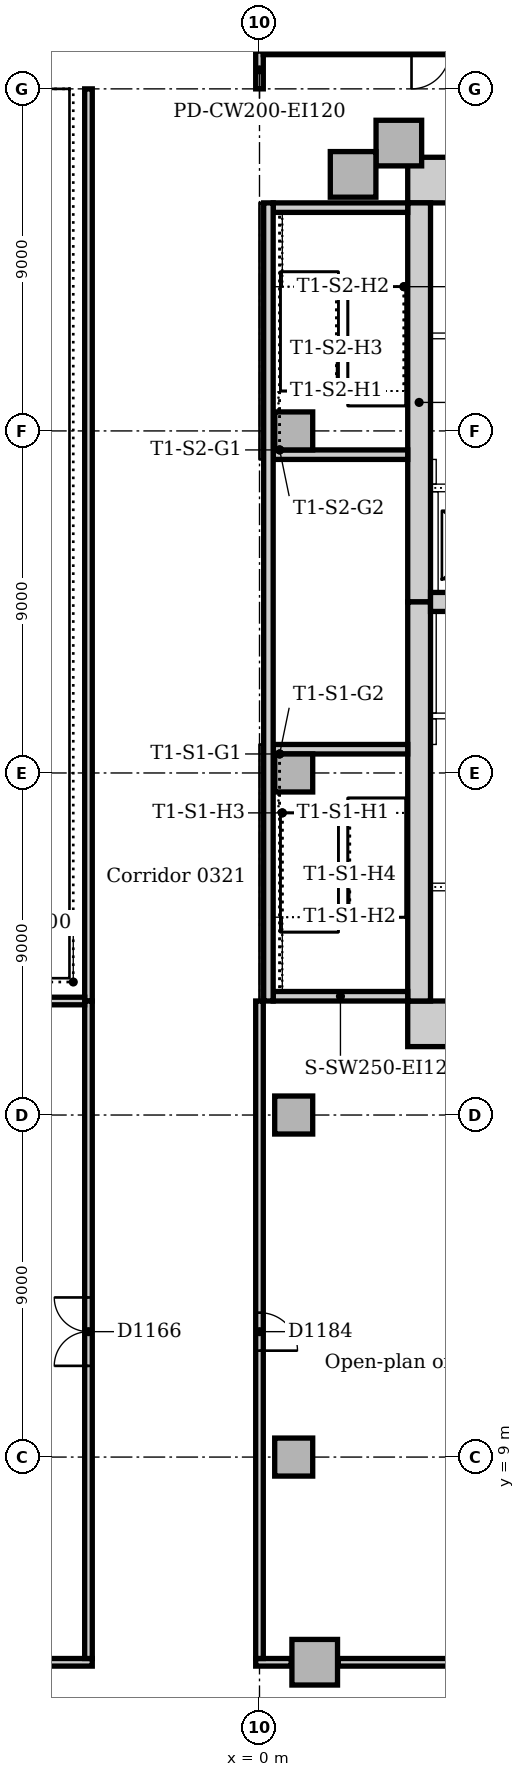
"""IFC4 building model, lengths in metres.
Left out: names, types, materials, properties, quantities, classifications, styles, units other than length and angle.
Written with IfcOpenShell. Run it as: python <this file> out.ifc"""

import sys

from ifc_helpers import new_model, si_unit, direction, frame, frame_2d, origin, origin_2d, place, context, subcontext, project, spatial, rectangle, extrude, element, fill, save


model = new_model("IFC4")
c1 = context("Model", 3, precision=1e-05, world=origin(), true_north=direction((0.0, 1.0)))
c2 = subcontext(c1, "Body", "Model", "MODEL_VIEW")
j1 = project(units=[si_unit("LENGTHUNIT", "METRE"), si_unit("PLANEANGLEUNIT", "RADIAN")], contexts=[c1])
p1 = place(None, origin())
s1 = spatial("IfcSite", under=j1, at=p1, CompositionType="ELEMENT")
p2 = place(p1, origin())
s2 = spatial("IfcBuilding", under=s1, at=p2, CompositionType="ELEMENT")
p3 = place(p2, frame((0.0, 0.0, 16.0)))
s3 = spatial("IfcBuildingStorey", under=s2, at=p3, CompositionType="ELEMENT", Elevation=16.0)
for number, where, z_axis, x_axis in (
    (1, (3.9, 20.4, 0.0), (0.0, 0.0, 1.0), (1.0, 0.0, 0.0)),
    (2, (23.7, 42.6, 0.0), (0.0, 0.0, 1.0), (-1.0, 0.0, 0.0)),
):
    element("IfcWall", number, at=place(p3, frame(where, z_axis=z_axis, x_axis=x_axis)), inside=s3, PredefinedType="SOLIDWALL", context=c2, shape_type="SweptSolid", body=[
        extrude(rectangle(XDim=19.8, YDim=1.2, at=frame_2d((9.9, 0.0))), origin(), (0.0, 0.0, 1.0), 5.0),
    ])
p4 = place(p3, frame((4.2, 42.0, 0.0), z_axis=(0.0, 0.0, 1.0), x_axis=(0.0, -1.0, 0.0)))
e3 = element("IfcWall", 3, at=p4, inside=s3, PredefinedType="SOLIDWALL", context=c2, shape_type="SweptSolid", body=[
    extrude(rectangle(XDim=10.5, YDim=0.6, at=frame_2d((5.25, 0.0))), origin(), (0.0, 0.0, 1.0), 5.0),
])
p5 = place(p4, frame((5.3, 0.0, 0.0)))
e4 = element("IfcOpeningElement", 4, at=p5, cuts=e3, PredefinedType="OPENING", context=c2, shape_type="SweptSolid", body=[
    extrude(rectangle(XDim=1.0, YDim=2.1, at=frame_2d((0.5, 1.05))), frame((0.0, 0.31, 0.0), z_axis=(0.0, -1.0, 0.0), x_axis=(1.0, 0.0, 0.0)), (0.0, 0.0, 1.0), 0.62),
])
p6 = place(p3, frame((4.2, 31.5, 0.0), z_axis=(0.0, 0.0, 1.0), x_axis=(0.0, -1.0, 0.0)))
e5 = element("IfcWall", 5, at=p6, inside=s3, PredefinedType="SOLIDWALL", context=c2, shape_type="SweptSolid", body=[
    extrude(rectangle(XDim=10.5, YDim=0.6, at=frame_2d((5.25, 0.0))), origin(), (0.0, 0.0, 1.0), 5.0),
])
p7 = place(p6, frame((4.25, 0.0, 0.0)))
e6 = element("IfcOpeningElement", 6, at=p7, cuts=e5, PredefinedType="OPENING", context=c2, shape_type="SweptSolid", body=[
    extrude(rectangle(XDim=1.0, YDim=2.1, at=frame_2d((0.5, 1.05))), frame((0.0, 0.31, 0.0), z_axis=(0.0, -1.0, 0.0), x_axis=(1.0, 0.0, 0.0)), (0.0, 0.0, 1.0), 0.62),
])
p8 = place(p3, frame((4.5, 31.5, 0.0), z_axis=(0.0, 0.0, 1.0), x_axis=(1.0, 0.0, 0.0)))
e7 = element("IfcWall", 7, at=p8, inside=s3, PredefinedType="SOLIDWALL", context=c2, shape_type="SweptSolid", body=[
    extrude(rectangle(XDim=18.0, YDim=0.5, at=frame_2d((9.0, 0.0))), origin(), (0.0, 0.0, 1.0), 5.0),
])
p9 = place(p3, frame((0.36, 21.125, 0.0), z_axis=(0.0, 0.0, 1.0), x_axis=(1.0, 0.0, 0.0)))
e8 = element("IfcWall", 8, at=p9, inside=s3, PredefinedType="SOLIDWALL", context=c2, shape_type="SweptSolid", body=[
    extrude(rectangle(XDim=3.54, YDim=0.25, at=frame_2d((1.77, 0.0))), origin(), (0.0, 0.0, 1.0), 5.0),
])
p10 = place(p3, frame((3.9, 27.625, 0.0), z_axis=(0.0, 0.0, 1.0), x_axis=(-1.0, 0.0, 0.0)))
e9 = element("IfcWall", 9, at=p10, inside=s3, PredefinedType="SOLIDWALL", context=c2, shape_type="SweptSolid", body=[
    extrude(rectangle(XDim=3.54, YDim=0.25, at=frame_2d((1.77, 0.0))), origin(), (0.0, 0.0, 1.0), 5.0),
])
p11 = place(p10, frame((0.4, 0.0, 0.0)))
e10 = element("IfcOpeningElement", 10, at=p11, cuts=e9, PredefinedType="OPENING", context=c2, shape_type="SweptSolid", body=[
    extrude(rectangle(XDim=1.0, YDim=2.1, at=frame_2d((0.5, 1.05))), frame((0.0, 0.135, 0.0), z_axis=(0.0, -1.0, 0.0), x_axis=(1.0, 0.0, 0.0)), (0.0, 0.0, 1.0), 0.27),
])
p12 = place(p3, frame((0.36, 35.375, 0.0), z_axis=(0.0, 0.0, 1.0), x_axis=(1.0, 0.0, 0.0)))
e11 = element("IfcWall", 11, at=p12, inside=s3, PredefinedType="SOLIDWALL", context=c2, shape_type="SweptSolid", body=[
    extrude(rectangle(XDim=3.54, YDim=0.25, at=frame_2d((1.77, 0.0))), origin(), (0.0, 0.0, 1.0), 5.0),
])
p13 = place(p12, frame((2.14, 0.0, 0.0)))
e12 = element("IfcOpeningElement", 12, at=p13, cuts=e11, PredefinedType="OPENING", context=c2, shape_type="SweptSolid", body=[
    extrude(rectangle(XDim=1.0, YDim=2.1, at=frame_2d((0.5, 1.05))), frame((0.0, 0.135, 0.0), z_axis=(0.0, -1.0, 0.0), x_axis=(1.0, 0.0, 0.0)), (0.0, 0.0, 1.0), 0.27),
])
p14 = place(p3, frame((3.9, 41.875, 0.0), z_axis=(0.0, 0.0, 1.0), x_axis=(-1.0, 0.0, 0.0)))
e13 = element("IfcWall", 13, at=p14, inside=s3, PredefinedType="SOLIDWALL", context=c2, shape_type="SweptSolid", body=[
    extrude(rectangle(XDim=3.54, YDim=0.25, at=frame_2d((1.77, 0.0))), origin(), (0.0, 0.0, 1.0), 5.0),
])
p15 = place(p3, frame((0.235, 21.0, 0.0), z_axis=(0.0, 0.0, 1.0), x_axis=(0.0, 1.0, 0.0)))
e14 = element("IfcWall", 14, at=p15, inside=s3, PredefinedType="SOLIDWALL", context=c2, shape_type="SweptSolid", body=[
    extrude(rectangle(XDim=21.0, YDim=0.25, at=frame_2d((10.5, 0.0))), origin(), (0.0, 0.0, 1.0), 5.0),
])
for number, where, z_axis, x_axis in (
    (15, (3.667, 43.574, 0.0), (0.0, 0.0, 1.0), (1.0, 0.0, 0.0)),
    (16, (2.463, 42.75, 0.0), (0.0, 0.0, 1.0), (1.0, 0.0, 0.0)),
    (17, (1.453, 3.602, 0.0), (0.0, 0.0, 1.0), (1.0, 0.0, 0.0)),
):
    element("IfcColumn", number, at=place(p3, frame(where, z_axis=z_axis, x_axis=x_axis)), inside=s3, PredefinedType="COLUMN", context=c2, shape_type="SweptSolid", body=[
        extrude(rectangle(XDim=1.2, YDim=1.2, at=origin_2d()), origin(), (0.0, 0.0, 1.0), 4.7),
    ])
for number, where, z_axis, x_axis in (
    (18, (0.9, 9.0, 0.0), (0.0, 0.0, 1.0), (1.0, 0.0, 0.0)),
    (19, (0.9, 18.0, 0.0), (0.0, 0.0, 1.0), (1.0, 0.0, 0.0)),
):
    element("IfcColumn", number, at=place(p3, frame(where, z_axis=z_axis, x_axis=x_axis)), inside=s3, PredefinedType="COLUMN", context=c2, shape_type="SweptSolid", body=[
        extrude(rectangle(XDim=1.0, YDim=1.0, at=origin_2d()), origin(), (0.0, 0.0, 1.0), 4.7),
    ])
for number, where, z_axis, x_axis in (
    (20, (0.9, 27.0, 0.0), (0.0, 0.0, 1.0), (1.0, 0.0, 0.0)),
    (21, (0.9, 36.0, 0.0), (0.0, 0.0, 1.0), (1.0, 0.0, 0.0)),
):
    element("IfcColumn", number, at=place(p3, frame(where, z_axis=z_axis, x_axis=x_axis)), inside=s3, PredefinedType="COLUMN", context=c2, shape_type="SweptSolid", body=[
        extrude(rectangle(XDim=1.0, YDim=1.0, at=origin_2d()), origin(), (0.0, 0.0, 1.0), 5.0),
    ])
p16 = place(p3, frame((-0.1, 3.6, 0.0), z_axis=(0.0, 0.0, 1.0), x_axis=(1.0, 0.0, 0.0)))
e22 = element("IfcWall", 22, at=p16, inside=s3, PredefinedType="PARTITIONING", context=c2, shape_type="SweptSolid", body=[
    extrude(rectangle(XDim=0.933, YDim=0.2, at=frame_2d((0.467, 0.0))), origin(), (0.0, 0.0, 1.0), 4.7),
])
p17 = place(p3, frame((2.073, 3.6, 0.0), z_axis=(0.0, 0.0, 1.0), x_axis=(1.0, 0.0, 0.0)))
e23 = element("IfcWall", 23, at=p17, inside=s3, PredefinedType="PARTITIONING", context=c2, shape_type="SweptSolid", body=[
    extrude(rectangle(XDim=6.927, YDim=0.2, at=frame_2d((3.463, 0.0))), origin(), (0.0, 0.0, 1.0), 4.7),
])
p18 = place(p3, frame((0.0, 45.0, 0.0), z_axis=(0.0, 0.0, 1.0), x_axis=(0.0, 1.0, 0.0)))
e24 = element("IfcWall", 24, at=p18, inside=s3, PredefinedType="PARTITIONING", context=c2, shape_type="SweptSolid", body=[
    extrude(rectangle(XDim=1.0, YDim=0.2, at=frame_2d((0.5, 0.0))), origin(), (0.0, 0.0, 1.0), 4.7),
])
p19 = place(p3, frame((0.1, 46.0, 0.0), z_axis=(0.0, 0.0, 1.0), x_axis=(1.0, 0.0, 0.0)))
e25 = element("IfcWall", 25, at=p19, inside=s3, PredefinedType="PARTITIONING", context=c2, shape_type="SweptSolid", body=[
    extrude(rectangle(XDim=8.9, YDim=0.2, at=frame_2d((4.45, 0.0))), origin(), (0.0, 0.0, 1.0), 4.7),
])
p20 = place(p19, frame((3.9, 0.0, 0.0)))
e26 = element("IfcOpeningElement", 26, at=p20, cuts=e25, PredefinedType="OPENING", context=c2, shape_type="SweptSolid", body=[
    extrude(rectangle(XDim=1.0, YDim=2.1, at=frame_2d((0.5, 1.05))), frame((0.0, 0.11, 0.0), z_axis=(0.0, -1.0, 0.0), x_axis=(1.0, 0.0, 0.0)), (0.0, 0.0, 1.0), 0.22),
])
p21 = place(p3, frame((-18.0, 3.6, 0.0), z_axis=(0.0, 0.0, 1.0), x_axis=(1.0, 0.0, 0.0)))
e27 = element("IfcWall", 27, at=p21, inside=s3, PredefinedType="PARTITIONING", context=c2, shape_type="SweptSolid", body=[
    extrude(rectangle(XDim=13.6, YDim=0.2, at=frame_2d((6.8, 0.0))), origin(), (0.0, 0.0, 1.0), 4.7),
])
p22 = place(p3, frame((-4.5, 21.0, 0.0), z_axis=(0.0, 0.0, 1.0), x_axis=(0.0, 1.0, 0.0)))
e28 = element("IfcWall", 28, at=p22, inside=s3, PredefinedType="PARTITIONING", context=c2, shape_type="SweptSolid", body=[
    extrude(rectangle(XDim=24.0, YDim=0.2, at=frame_2d((12.0, 0.0))), origin(), (0.0, 0.0, 1.0), 4.7),
])
p23 = place(p3, frame((-4.5, 3.7, 0.0), z_axis=(0.0, 0.0, 1.0), x_axis=(0.0, 1.0, 0.0)))
e29 = element("IfcWall", 29, at=p23, inside=s3, PredefinedType="PARTITIONING", context=c2, shape_type="SweptSolid", body=[
    extrude(rectangle(XDim=17.3, YDim=0.2, at=frame_2d((8.65, 0.0))), origin(), (0.0, 0.0, 1.0), 4.7),
])
p24 = place(p23, frame((7.7, 0.0, 0.0)))
e30 = element("IfcOpeningElement", 30, at=p24, cuts=e29, PredefinedType="OPENING", context=c2, shape_type="SweptSolid", body=[
    extrude(rectangle(XDim=1.8, YDim=2.1, at=frame_2d((0.9, 1.05))), frame((0.0, 0.11, 0.0), z_axis=(0.0, -1.0, 0.0), x_axis=(1.0, 0.0, 0.0)), (0.0, 0.0, 1.0), 0.22),
])
p25 = place(p3, frame((0.0, 3.7, 0.0), z_axis=(0.0, 0.0, 1.0), x_axis=(0.0, 1.0, 0.0)))
e31 = element("IfcWall", 31, at=p25, inside=s3, PredefinedType="PARTITIONING", context=c2, shape_type="SweptSolid", body=[
    extrude(rectangle(XDim=17.3, YDim=0.2, at=frame_2d((8.65, 0.0))), origin(), (0.0, 0.0, 1.0), 4.7),
])
p26 = place(p25, frame((8.1, 0.0, 0.0)))
e32 = element("IfcOpeningElement", 32, at=p26, cuts=e31, PredefinedType="OPENING", context=c2, shape_type="SweptSolid", body=[
    extrude(rectangle(XDim=1.0, YDim=2.1, at=frame_2d((0.5, 1.05))), frame((0.0, 0.11, 0.0), z_axis=(0.0, -1.0, 0.0), x_axis=(1.0, 0.0, 0.0)), (0.0, 0.0, 1.0), 0.22),
])
p27 = place(p3, frame((-18.0, 21.0, 0.0), z_axis=(0.0, 0.0, 1.0), x_axis=(1.0, 0.0, 0.0)))
e33 = element("IfcWall", 33, at=p27, inside=s3, PredefinedType="PARTITIONING", context=c2, shape_type="SweptSolid", body=[
    extrude(rectangle(XDim=13.4, YDim=0.2, at=frame_2d((6.7, 0.0))), origin(), (0.0, 0.0, 1.0), 4.7),
])
for number, where, z_axis, x_axis in (
    (34, (0.48, 21.25, 0.0), (0.0, 0.0, 1.0), (0.0, 1.0, 0.0)),
    (35, (0.48, 39.795, 0.0), (0.0, 0.0, 1.0), (0.0, 1.0, 0.0)),
):
    element("IfcWall", number, at=place(p3, frame(where, z_axis=z_axis, x_axis=x_axis)), inside=s3, PredefinedType="STANDARD", context=c2, shape_type="SweptSolid", body=[
        extrude(rectangle(XDim=1.955, YDim=0.24, at=frame_2d((0.978, 0.0))), origin(), (0.0, 0.0, 1.0), 5.0),
    ])
p28 = place(p3, frame((4.5, 24.0, 0.0), z_axis=(0.0, 0.0, 1.0), x_axis=(1.0, 0.0, 0.0)))
e36 = element("IfcWall", 36, at=p28, inside=s3, PredefinedType="PARTITIONING", context=c2, shape_type="SweptSolid", body=[
    extrude(rectangle(XDim=18.0, YDim=0.2, at=frame_2d((9.0, 0.0))), origin(), (0.0, 0.0, 1.0), 4.7),
])
p29 = place(p28, frame((0.95, 0.0, 0.0)))
e37 = element("IfcOpeningElement", 37, at=p29, cuts=e36, PredefinedType="OPENING", context=c2, shape_type="SweptSolid", body=[
    extrude(rectangle(XDim=1.1, YDim=2.1, at=frame_2d((0.55, 1.05))), frame((0.0, 0.11, 0.0), z_axis=(0.0, -1.0, 0.0), x_axis=(1.0, 0.0, 0.0)), (0.0, 0.0, 1.0), 0.22),
])
p30 = place(p28, frame((3.95, 0.0, 0.0)))
e38 = element("IfcOpeningElement", 38, at=p30, cuts=e36, PredefinedType="OPENING", context=c2, shape_type="SweptSolid", body=[
    extrude(rectangle(XDim=1.1, YDim=2.1, at=frame_2d((0.55, 1.05))), frame((0.0, 0.11, 0.0), z_axis=(0.0, -1.0, 0.0), x_axis=(1.0, 0.0, 0.0)), (0.0, 0.0, 1.0), 0.22),
])
p31 = place(p28, frame((6.95, 0.0, 0.0)))
e39 = element("IfcOpeningElement", 39, at=p31, cuts=e36, PredefinedType="OPENING", context=c2, shape_type="SweptSolid", body=[
    extrude(rectangle(XDim=1.1, YDim=2.1, at=frame_2d((0.55, 1.05))), frame((0.0, 0.11, 0.0), z_axis=(0.0, -1.0, 0.0), x_axis=(1.0, 0.0, 0.0)), (0.0, 0.0, 1.0), 0.22),
])
p32 = place(p28, frame((9.95, 0.0, 0.0)))
e40 = element("IfcOpeningElement", 40, at=p32, cuts=e36, PredefinedType="OPENING", context=c2, shape_type="SweptSolid", body=[
    extrude(rectangle(XDim=1.1, YDim=2.1, at=frame_2d((0.55, 1.05))), frame((0.0, 0.11, 0.0), z_axis=(0.0, -1.0, 0.0), x_axis=(1.0, 0.0, 0.0)), (0.0, 0.0, 1.0), 0.22),
])
p33 = place(p28, frame((12.95, 0.0, 0.0)))
e41 = element("IfcOpeningElement", 41, at=p33, cuts=e36, PredefinedType="OPENING", context=c2, shape_type="SweptSolid", body=[
    extrude(rectangle(XDim=1.1, YDim=2.1, at=frame_2d((0.55, 1.05))), frame((0.0, 0.11, 0.0), z_axis=(0.0, -1.0, 0.0), x_axis=(1.0, 0.0, 0.0)), (0.0, 0.0, 1.0), 0.22),
])
p34 = place(p28, frame((15.95, 0.0, 0.0)))
e42 = element("IfcOpeningElement", 42, at=p34, cuts=e36, PredefinedType="OPENING", context=c2, shape_type="SweptSolid", body=[
    extrude(rectangle(XDim=1.1, YDim=2.1, at=frame_2d((0.55, 1.05))), frame((0.0, 0.11, 0.0), z_axis=(0.0, -1.0, 0.0), x_axis=(1.0, 0.0, 0.0)), (0.0, 0.0, 1.0), 0.22),
])
p35 = place(p3, frame((4.5, 34.5, 0.0), z_axis=(0.0, 0.0, 1.0), x_axis=(1.0, 0.0, 0.0)))
e43 = element("IfcWall", 43, at=p35, inside=s3, PredefinedType="PARTITIONING", context=c2, shape_type="SweptSolid", body=[
    extrude(rectangle(XDim=18.0, YDim=0.2, at=frame_2d((9.0, 0.0))), origin(), (0.0, 0.0, 1.0), 4.7),
])
p36 = place(p35, frame((0.95, 0.0, 0.0)))
e44 = element("IfcOpeningElement", 44, at=p36, cuts=e43, PredefinedType="OPENING", context=c2, shape_type="SweptSolid", body=[
    extrude(rectangle(XDim=1.1, YDim=2.1, at=frame_2d((0.55, 1.05))), frame((0.0, 0.11, 0.0), z_axis=(0.0, -1.0, 0.0), x_axis=(1.0, 0.0, 0.0)), (0.0, 0.0, 1.0), 0.22),
])
p37 = place(p35, frame((3.95, 0.0, 0.0)))
e45 = element("IfcOpeningElement", 45, at=p37, cuts=e43, PredefinedType="OPENING", context=c2, shape_type="SweptSolid", body=[
    extrude(rectangle(XDim=1.1, YDim=2.1, at=frame_2d((0.55, 1.05))), frame((0.0, 0.11, 0.0), z_axis=(0.0, -1.0, 0.0), x_axis=(1.0, 0.0, 0.0)), (0.0, 0.0, 1.0), 0.22),
])
p38 = place(p35, frame((12.95, 0.0, 0.0)))
e46 = element("IfcOpeningElement", 46, at=p38, cuts=e43, PredefinedType="OPENING", context=c2, shape_type="SweptSolid", body=[
    extrude(rectangle(XDim=1.1, YDim=2.1, at=frame_2d((0.55, 1.05))), frame((0.0, 0.11, 0.0), z_axis=(0.0, -1.0, 0.0), x_axis=(1.0, 0.0, 0.0)), (0.0, 0.0, 1.0), 0.22),
])
p39 = place(p35, frame((15.95, 0.0, 0.0)))
e47 = element("IfcOpeningElement", 47, at=p39, cuts=e43, PredefinedType="OPENING", context=c2, shape_type="SweptSolid", body=[
    extrude(rectangle(XDim=1.1, YDim=2.1, at=frame_2d((0.55, 1.05))), frame((0.0, 0.11, 0.0), z_axis=(0.0, -1.0, 0.0), x_axis=(1.0, 0.0, 0.0)), (0.0, 0.0, 1.0), 0.22),
])
p40 = place(p3, frame((4.6, 31.75, 0.0), z_axis=(0.0, 0.0, 1.0), x_axis=(0.0, 1.0, 0.0)))
e48 = element("IfcWall", 48, at=p40, inside=s3, PredefinedType="PARTITIONING", context=c2, shape_type="SweptSolid", body=[
    extrude(rectangle(XDim=2.65, YDim=0.2, at=frame_2d((1.325, 0.0))), origin(), (0.0, 0.0, 1.0), 4.7),
])
p41 = place(p3, frame((4.5, 28.5, 0.0), z_axis=(0.0, 0.0, 1.0), x_axis=(1.0, 0.0, 0.0)))
e49 = element("IfcWall", 49, at=p41, inside=s3, PredefinedType="PARTITIONING", context=c2, shape_type="SweptSolid", body=[
    extrude(rectangle(XDim=18.0, YDim=0.15, at=frame_2d((9.0, 0.0))), origin(), (0.0, 0.0, 1.0), 4.7),
])
p42 = place(p41, frame((4.1, 0.0, 0.0)))
e50 = element("IfcOpeningElement", 50, at=p42, cuts=e49, PredefinedType="OPENING", context=c2, shape_type="SweptSolid", body=[
    extrude(rectangle(XDim=0.9, YDim=2.1, at=frame_2d((0.45, 1.05))), frame((0.0, 0.085, 0.0), z_axis=(0.0, -1.0, 0.0), x_axis=(1.0, 0.0, 0.0)), (0.0, 0.0, 1.0), 0.17),
])
p43 = place(p41, frame((10.8, 0.0, 0.0)))
e51 = element("IfcOpeningElement", 51, at=p43, cuts=e49, PredefinedType="OPENING", context=c2, shape_type="SweptSolid", body=[
    extrude(rectangle(XDim=0.9, YDim=2.1, at=frame_2d((0.45, 1.05))), frame((0.0, 0.085, 0.0), z_axis=(0.0, -1.0, 0.0), x_axis=(1.0, 0.0, 0.0)), (0.0, 0.0, 1.0), 0.17),
])
p44 = place(p41, frame((15.2, 0.0, 0.0)))
e52 = element("IfcOpeningElement", 52, at=p44, cuts=e49, PredefinedType="OPENING", context=c2, shape_type="SweptSolid", body=[
    extrude(rectangle(XDim=0.9, YDim=2.1, at=frame_2d((0.45, 1.05))), frame((0.0, 0.085, 0.0), z_axis=(0.0, -1.0, 0.0), x_axis=(1.0, 0.0, 0.0)), (0.0, 0.0, 1.0), 0.17),
])
p45 = place(p3, frame((4.5, 38.5, 0.0), z_axis=(0.0, 0.0, 1.0), x_axis=(1.0, 0.0, 0.0)))
e53 = element("IfcWall", 53, at=p45, inside=s3, PredefinedType="PARTITIONING", context=c2, shape_type="SweptSolid", body=[
    extrude(rectangle(XDim=11.9, YDim=0.15, at=frame_2d((5.95, 0.0))), origin(), (0.0, 0.0, 1.0), 4.7),
])
p46 = place(p45, frame((1.1, 0.0, 0.0)))
e54 = element("IfcOpeningElement", 54, at=p46, cuts=e53, PredefinedType="OPENING", context=c2, shape_type="SweptSolid", body=[
    extrude(rectangle(XDim=0.9, YDim=2.1, at=frame_2d((0.45, 1.05))), frame((0.0, 0.085, 0.0), z_axis=(0.0, -1.0, 0.0), x_axis=(1.0, 0.0, 0.0)), (0.0, 0.0, 1.0), 0.17),
])
p47 = place(p45, frame((4.05, 0.0, 0.0)))
e55 = element("IfcOpeningElement", 55, at=p47, cuts=e53, PredefinedType="OPENING", context=c2, shape_type="SweptSolid", body=[
    extrude(rectangle(XDim=0.9, YDim=2.1, at=frame_2d((0.45, 1.05))), frame((0.0, 0.085, 0.0), z_axis=(0.0, -1.0, 0.0), x_axis=(1.0, 0.0, 0.0)), (0.0, 0.0, 1.0), 0.17),
])
p48 = place(p45, frame((7.05, 0.0, 0.0)))
e56 = element("IfcOpeningElement", 56, at=p48, cuts=e53, PredefinedType="OPENING", context=c2, shape_type="SweptSolid", body=[
    extrude(rectangle(XDim=0.9, YDim=2.1, at=frame_2d((0.45, 1.05))), frame((0.0, 0.085, 0.0), z_axis=(0.0, -1.0, 0.0), x_axis=(1.0, 0.0, 0.0)), (0.0, 0.0, 1.0), 0.17),
])
p49 = place(p45, frame((9.95, 0.0, 0.0)))
e57 = element("IfcOpeningElement", 57, at=p49, cuts=e53, PredefinedType="OPENING", context=c2, shape_type="SweptSolid", body=[
    extrude(rectangle(XDim=0.8, YDim=2.1, at=frame_2d((0.4, 1.05))), frame((0.0, 0.085, 0.0), z_axis=(0.0, -1.0, 0.0), x_axis=(1.0, 0.0, 0.0)), (0.0, 0.0, 1.0), 0.17),
])
p50 = place(p3, frame((4.575, 27.75, 0.0), z_axis=(0.0, 0.0, 1.0), x_axis=(0.0, 1.0, 0.0)))
e58 = element("IfcWall", 58, at=p50, inside=s3, PredefinedType="PARTITIONING", context=c2, shape_type="SweptSolid", body=[
    extrude(rectangle(XDim=0.675, YDim=0.15, at=frame_2d((0.338, 0.0))), origin(), (0.0, 0.0, 1.0), 4.7),
])
p51 = place(p3, frame((4.575, 28.575, 0.0), z_axis=(0.0, 0.0, 1.0), x_axis=(0.0, 1.0, 0.0)))
e59 = element("IfcWall", 59, at=p51, inside=s3, PredefinedType="PARTITIONING", context=c2, shape_type="SweptSolid", body=[
    extrude(rectangle(XDim=2.675, YDim=0.15, at=frame_2d((1.337, 0.0))), origin(), (0.0, 0.0, 1.0), 4.7),
])
p52 = place(p3, frame((4.575, 34.6, 0.0), z_axis=(0.0, 0.0, 1.0), x_axis=(0.0, 1.0, 0.0)))
e60 = element("IfcWall", 60, at=p52, inside=s3, PredefinedType="PARTITIONING", context=c2, shape_type="SweptSolid", body=[
    extrude(rectangle(XDim=0.65, YDim=0.15, at=frame_2d((0.325, 0.0))), origin(), (0.0, 0.0, 1.0), 4.7),
])
p53 = place(p24, origin())
e61 = element("IfcDoor", 61, at=p53, inside=s3, OperationType="DOUBLE_DOOR_SINGLE_SWING", PredefinedType="DOOR", context=c2, shape_type="SweptSolid", body=[
    extrude(rectangle(XDim=1.8, YDim=2.1, at=frame_2d((0.9, 1.05))), frame((0.0, 0.025, 0.0), z_axis=(0.0, -1.0, 0.0), x_axis=(1.0, 0.0, 0.0)), (0.0, 0.0, 1.0), 0.05),
])
fill(e30, e61)
p54 = place(p26, frame((1.0, 0.0, 0.0), z_axis=(0.0, 0.0, 1.0), x_axis=(-1.0, 0.0, 0.0)))
e62 = element("IfcDoor", 62, at=p54, inside=s3, OperationType="SINGLE_SWING_RIGHT", PredefinedType="DOOR", context=c2, shape_type="SweptSolid", body=[
    extrude(rectangle(XDim=1.0, YDim=2.1, at=frame_2d((0.5, 1.05))), frame((0.0, 0.025, 0.0), z_axis=(0.0, -1.0, 0.0), x_axis=(1.0, 0.0, 0.0)), (0.0, 0.0, 1.0), 0.05),
])
fill(e32, e62)
p55 = place(p7, frame((1.0, 0.0, 0.0), z_axis=(0.0, 0.0, 1.0), x_axis=(-1.0, 0.0, 0.0)))
e63 = element("IfcDoor", 63, at=p55, inside=s3, OperationType="SINGLE_SWING_RIGHT", PredefinedType="DOOR", context=c2, shape_type="SweptSolid", body=[
    extrude(rectangle(XDim=1.0, YDim=2.1, at=frame_2d((0.5, 1.05))), frame((0.0, 0.025, 0.0), z_axis=(0.0, -1.0, 0.0), x_axis=(1.0, 0.0, 0.0)), (0.0, 0.0, 1.0), 0.05),
])
fill(e6, e63)
p56 = place(p11, origin())
e64 = element("IfcDoor", 64, at=p56, inside=s3, OperationType="SINGLE_SWING_LEFT", PredefinedType="DOOR", context=c2, shape_type="SweptSolid", body=[
    extrude(rectangle(XDim=1.0, YDim=2.1, at=frame_2d((0.5, 1.05))), frame((0.0, 0.025, 0.0), z_axis=(0.0, -1.0, 0.0), x_axis=(1.0, 0.0, 0.0)), (0.0, 0.0, 1.0), 0.05),
])
fill(e10, e64)
p57 = place(p5, frame((1.0, 0.0, 0.0), z_axis=(0.0, 0.0, 1.0), x_axis=(-1.0, 0.0, 0.0)))
e65 = element("IfcDoor", 65, at=p57, inside=s3, OperationType="SINGLE_SWING_LEFT", PredefinedType="DOOR", context=c2, shape_type="SweptSolid", body=[
    extrude(rectangle(XDim=1.0, YDim=2.1, at=frame_2d((0.5, 1.05))), frame((0.0, 0.025, 0.0), z_axis=(0.0, -1.0, 0.0), x_axis=(1.0, 0.0, 0.0)), (0.0, 0.0, 1.0), 0.05),
])
fill(e4, e65)
p58 = place(p13, origin())
e66 = element("IfcDoor", 66, at=p58, inside=s3, OperationType="SINGLE_SWING_RIGHT", PredefinedType="DOOR", context=c2, shape_type="SweptSolid", body=[
    extrude(rectangle(XDim=1.0, YDim=2.1, at=frame_2d((0.5, 1.05))), frame((0.0, 0.025, 0.0), z_axis=(0.0, -1.0, 0.0), x_axis=(1.0, 0.0, 0.0)), (0.0, 0.0, 1.0), 0.05),
])
fill(e12, e66)
save(model, sys.argv[1])
